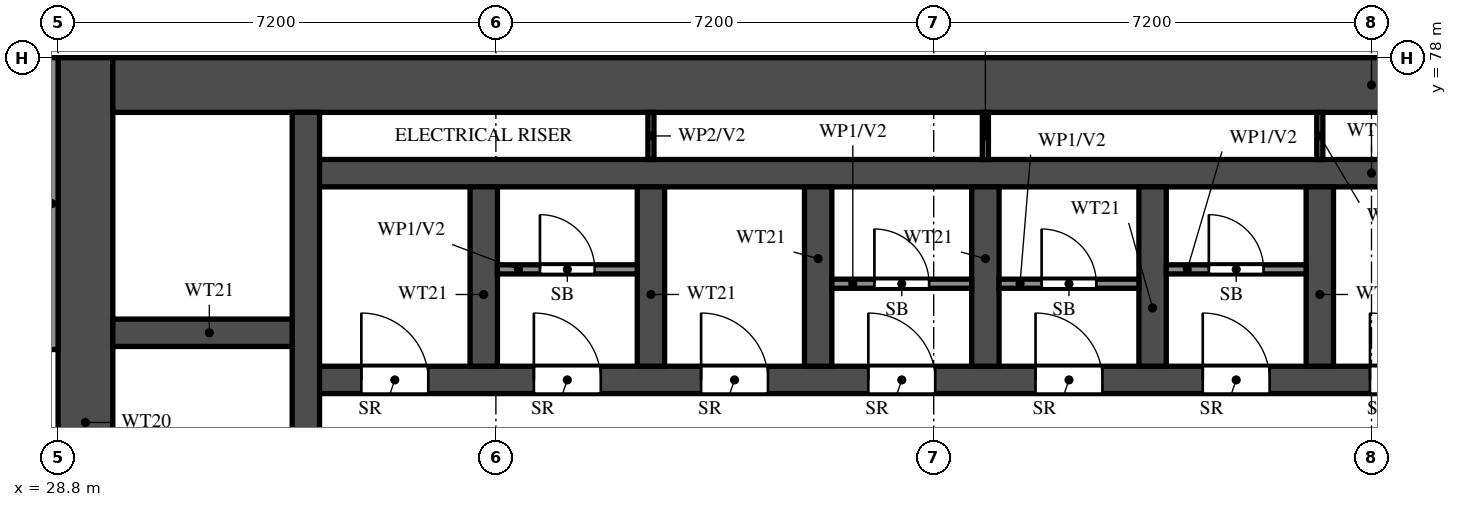
"""IFC4 building model, lengths in metres.
Left out: names, types, materials, properties, quantities, classifications, styles, units other than length and angle.
Written with IfcOpenShell. Run it as: python <this file> out.ifc"""

import sys

from ifc_helpers import new_model, si_unit, direction, frame, frame_2d, origin, place, context, subcontext, project, spatial, rectangle, extrude, element, fill, save


model = new_model("IFC4")
c1 = context("Model", 3, precision=1e-05, world=origin(), true_north=direction((0.0, 1.0)))
c2 = subcontext(c1, "Body", "Model", "MODEL_VIEW")
j1 = project(units=[si_unit("LENGTHUNIT", "METRE"), si_unit("PLANEANGLEUNIT", "RADIAN")], contexts=[c1])
p1 = place(None, origin())
s1 = spatial("IfcSite", under=j1, at=p1, CompositionType="ELEMENT")
p2 = place(p1, origin())
s2 = spatial("IfcBuilding", under=s1, at=p2, CompositionType="ELEMENT")
p3 = place(p2, frame((0.0, 0.0, 72.5)))
s3 = spatial("IfcBuildingStorey", under=s2, at=p3, CompositionType="ELEMENT", Elevation=72.5)
p4 = place(p3, frame((29.25, 66.0, 0.0), z_axis=(0.0, 0.0, 1.0), x_axis=(0.0, 1.0, 0.0)))
e1 = element("IfcWall", 1, at=p4, inside=s3, PredefinedType="SHEAR", context=c2, shape_type="SweptSolid", body=[
    extrude(rectangle(XDim=12.0, YDim=0.9, at=frame_2d((6.0, 0.0))), origin(), (0.0, 0.0, 1.0), 3.18),
])
p5 = place(p3, frame((29.7, 77.55, 0.0), z_axis=(0.0, 0.0, 1.0), x_axis=(1.0, 0.0, 0.0)))
e2 = element("IfcWall", 2, at=p5, inside=s3, PredefinedType="SHEAR", context=c2, shape_type="SweptSolid", body=[
    extrude(rectangle(XDim=41.4, YDim=0.9, at=frame_2d((20.7, 0.0))), origin(), (0.0, 0.0, 1.0), 3.18),
])
p6 = place(p3, frame((32.875, 72.7, 0.0), z_axis=(0.0, 0.0, 1.0), x_axis=(1.0, 0.0, 0.0)))
e3 = element("IfcWall", 3, at=p6, inside=s3, PredefinedType="SHEAR", context=c2, shape_type="SweptSolid", body=[
    extrude(rectangle(XDim=35.05, YDim=0.45, at=frame_2d((17.525, 0.0))), origin(), (0.0, 0.0, 1.0), 3.18),
])
p7 = place(p6, frame((19.8, 0.0, 0.0)))
e4 = element("IfcOpeningElement", 4, at=p7, cuts=e3, PredefinedType="OPENING", context=c2, shape_type="SweptSolid", body=[
    extrude(rectangle(XDim=1.1, YDim=2.1, at=frame_2d((0.55, 1.05))), frame((0.0, 0.235, 0.0), z_axis=(0.0, -1.0, 0.0), x_axis=(1.0, 0.0, 0.0)), (0.0, 0.0, 1.0), 0.47),
])
p8 = place(p6, frame((27.65, 0.0, 0.0)))
e5 = element("IfcOpeningElement", 5, at=p8, cuts=e3, PredefinedType="OPENING", context=c2, shape_type="SweptSolid", body=[
    extrude(rectangle(XDim=1.1, YDim=2.1, at=frame_2d((0.55, 1.05))), frame((0.0, 0.235, 0.0), z_axis=(0.0, -1.0, 0.0), x_axis=(1.0, 0.0, 0.0)), (0.0, 0.0, 1.0), 0.47),
])
p9 = place(p6, frame((30.25, 0.0, 0.0)))
e6 = element("IfcOpeningElement", 6, at=p9, cuts=e3, PredefinedType="OPENING", context=c2, shape_type="SweptSolid", body=[
    extrude(rectangle(XDim=1.1, YDim=2.1, at=frame_2d((0.55, 1.05))), frame((0.0, 0.235, 0.0), z_axis=(0.0, -1.0, 0.0), x_axis=(1.0, 0.0, 0.0)), (0.0, 0.0, 1.0), 0.47),
])
p10 = place(p6, frame((3.75, 0.0, 0.0)))
e7 = element("IfcOpeningElement", 7, at=p10, cuts=e3, PredefinedType="OPENING", context=c2, shape_type="SweptSolid", body=[
    extrude(rectangle(XDim=1.1, YDim=2.1, at=frame_2d((0.55, 1.05))), frame((0.0, 0.235, 0.0), z_axis=(0.0, -1.0, 0.0), x_axis=(1.0, 0.0, 0.0)), (0.0, 0.0, 1.0), 0.47),
])
p11 = place(p6, frame((6.5, 0.0, 0.0)))
e8 = element("IfcOpeningElement", 8, at=p11, cuts=e3, PredefinedType="OPENING", context=c2, shape_type="SweptSolid", body=[
    extrude(rectangle(XDim=1.1, YDim=2.1, at=frame_2d((0.55, 1.05))), frame((0.0, 0.235, 0.0), z_axis=(0.0, -1.0, 0.0), x_axis=(1.0, 0.0, 0.0)), (0.0, 0.0, 1.0), 0.47),
])
p12 = place(p6, frame((9.25, 0.0, 0.0)))
e9 = element("IfcOpeningElement", 9, at=p12, cuts=e3, PredefinedType="OPENING", context=c2, shape_type="SweptSolid", body=[
    extrude(rectangle(XDim=1.1, YDim=2.1, at=frame_2d((0.55, 1.05))), frame((0.0, 0.235, 0.0), z_axis=(0.0, -1.0, 0.0), x_axis=(1.0, 0.0, 0.0)), (0.0, 0.0, 1.0), 0.47),
])
p13 = place(p6, frame((12.0, 0.0, 0.0)))
e10 = element("IfcOpeningElement", 10, at=p13, cuts=e3, PredefinedType="OPENING", context=c2, shape_type="SweptSolid", body=[
    extrude(rectangle(XDim=1.1, YDim=2.1, at=frame_2d((0.55, 1.05))), frame((0.0, 0.235, 0.0), z_axis=(0.0, -1.0, 0.0), x_axis=(1.0, 0.0, 0.0)), (0.0, 0.0, 1.0), 0.47),
])
p14 = place(p6, frame((14.75, 0.0, 0.0)))
e11 = element("IfcOpeningElement", 11, at=p14, cuts=e3, PredefinedType="OPENING", context=c2, shape_type="SweptSolid", body=[
    extrude(rectangle(XDim=1.1, YDim=2.1, at=frame_2d((0.55, 1.05))), frame((0.0, 0.235, 0.0), z_axis=(0.0, -1.0, 0.0), x_axis=(1.0, 0.0, 0.0)), (0.0, 0.0, 1.0), 0.47),
])
p15 = place(p6, frame((17.5, 0.0, 0.0)))
e12 = element("IfcOpeningElement", 12, at=p15, cuts=e3, PredefinedType="OPENING", context=c2, shape_type="SweptSolid", body=[
    extrude(rectangle(XDim=1.1, YDim=2.1, at=frame_2d((0.55, 1.05))), frame((0.0, 0.235, 0.0), z_axis=(0.0, -1.0, 0.0), x_axis=(1.0, 0.0, 0.0)), (0.0, 0.0, 1.0), 0.47),
])
p16 = place(p6, frame((0.913, 0.0, 0.0)))
e13 = element("IfcOpeningElement", 13, at=p16, cuts=e3, PredefinedType="OPENING", context=c2, shape_type="SweptSolid", body=[
    extrude(rectangle(XDim=1.1, YDim=2.1, at=frame_2d((0.55, 1.05))), frame((0.0, 0.235, 0.0), z_axis=(0.0, -1.0, 0.0), x_axis=(1.0, 0.0, 0.0)), (0.0, 0.0, 1.0), 0.47),
])
p17 = place(p3, frame((32.875, 76.1, 0.0), z_axis=(0.0, 0.0, 1.0), x_axis=(1.0, 0.0, 0.0)))
e14 = element("IfcWall", 14, at=p17, inside=s3, PredefinedType="SHEAR", context=c2, shape_type="SweptSolid", body=[
    extrude(rectangle(XDim=35.05, YDim=0.45, at=frame_2d((17.525, 0.0))), origin(), (0.0, 0.0, 1.0), 3.18),
])
p18 = place(p3, frame((29.7, 73.475, 0.0), z_axis=(0.0, 0.0, 1.0), x_axis=(1.0, 0.0, 0.0)))
e15 = element("IfcWall", 15, at=p18, inside=s3, PredefinedType="SHEAR", context=c2, shape_type="SweptSolid", body=[
    extrude(rectangle(XDim=3.175, YDim=0.45, at=frame_2d((1.587, 0.0))), origin(), (0.0, 0.0, 1.0), 3.18),
])
p19 = place(p3, frame((32.875, 66.45, 0.0), z_axis=(0.0, 0.0, 1.0), x_axis=(0.0, 1.0, 0.0)))
e16 = element("IfcWall", 16, at=p19, inside=s3, PredefinedType="SHEAR", context=c2, shape_type="SweptSolid", body=[
    extrude(rectangle(XDim=10.65, YDim=0.45, at=frame_2d((5.325, 0.0))), origin(), (0.0, 0.0, 1.0), 3.18),
])
for number, where, z_axis, x_axis in (
    (17, (35.8, 72.925, 0.0), (0.0, 0.0, 1.0), (0.0, 1.0, 0.0)),
    (18, (38.55, 72.925, 0.0), (0.0, 0.0, 1.0), (0.0, 1.0, 0.0)),
    (19, (41.3, 72.925, 0.0), (0.0, 0.0, 1.0), (0.0, 1.0, 0.0)),
    (20, (44.05, 72.925, 0.0), (0.0, 0.0, 1.0), (0.0, 1.0, 0.0)),
    (21, (46.8, 72.925, 0.0), (0.0, 0.0, 1.0), (0.0, 1.0, 0.0)),
    (22, (49.55, 72.925, 0.0), (0.0, 0.0, 1.0), (0.0, 1.0, 0.0)),
):
    element("IfcWall", number, at=place(p3, frame(where, z_axis=z_axis, x_axis=x_axis)), inside=s3, PredefinedType="SHEAR", context=c2, shape_type="SweptSolid", body=[
        extrude(rectangle(XDim=2.95, YDim=0.45, at=frame_2d((1.475, 0.0))), origin(), (0.0, 0.0, 1.0), 3.18),
    ])
p20 = place(p3, frame((36.025, 74.518, 0.0), z_axis=(0.0, 0.0, 1.0), x_axis=(1.0, 0.0, 0.0)))
e23 = element("IfcWall", 23, at=p20, inside=s3, PredefinedType="PARTITIONING", context=c2, shape_type="SweptSolid", body=[
    extrude(rectangle(XDim=2.3, YDim=0.15, at=frame_2d((1.15, 0.0))), origin(), (0.0, 0.0, 1.0), 3.18),
])
p21 = place(p20, frame((0.7, 0.0, 0.0)))
e24 = element("IfcOpeningElement", 24, at=p21, cuts=e23, PredefinedType="OPENING", context=c2, shape_type="SweptSolid", body=[
    extrude(rectangle(XDim=0.9, YDim=2.1, at=frame_2d((0.45, 1.05))), frame((0.0, 0.085, 0.0), z_axis=(0.0, -1.0, 0.0), x_axis=(1.0, 0.0, 0.0)), (0.0, 0.0, 1.0), 0.17),
])
p22 = place(p3, frame((41.525, 74.282, 0.0), z_axis=(0.0, 0.0, 1.0), x_axis=(1.0, 0.0, 0.0)))
e25 = element("IfcWall", 25, at=p22, inside=s3, PredefinedType="PARTITIONING", context=c2, shape_type="SweptSolid", body=[
    extrude(rectangle(XDim=2.3, YDim=0.15, at=frame_2d((1.15, 0.0))), origin(), (0.0, 0.0, 1.0), 3.18),
])
p23 = place(p22, frame((0.7, 0.0, 0.0)))
e26 = element("IfcOpeningElement", 26, at=p23, cuts=e25, PredefinedType="OPENING", context=c2, shape_type="SweptSolid", body=[
    extrude(rectangle(XDim=0.9, YDim=2.1, at=frame_2d((0.45, 1.05))), frame((0.0, 0.085, 0.0), z_axis=(0.0, -1.0, 0.0), x_axis=(1.0, 0.0, 0.0)), (0.0, 0.0, 1.0), 0.17),
])
p24 = place(p3, frame((44.275, 74.282, 0.0), z_axis=(0.0, 0.0, 1.0), x_axis=(1.0, 0.0, 0.0)))
e27 = element("IfcWall", 27, at=p24, inside=s3, PredefinedType="PARTITIONING", context=c2, shape_type="SweptSolid", body=[
    extrude(rectangle(XDim=2.3, YDim=0.15, at=frame_2d((1.15, 0.0))), origin(), (0.0, 0.0, 1.0), 3.18),
])
p25 = place(p24, frame((0.7, 0.0, 0.0)))
e28 = element("IfcOpeningElement", 28, at=p25, cuts=e27, PredefinedType="OPENING", context=c2, shape_type="SweptSolid", body=[
    extrude(rectangle(XDim=0.9, YDim=2.1, at=frame_2d((0.45, 1.05))), frame((0.0, 0.085, 0.0), z_axis=(0.0, -1.0, 0.0), x_axis=(1.0, 0.0, 0.0)), (0.0, 0.0, 1.0), 0.17),
])
p26 = place(p3, frame((47.025, 74.518, 0.0), z_axis=(0.0, 0.0, 1.0), x_axis=(1.0, 0.0, 0.0)))
e29 = element("IfcWall", 29, at=p26, inside=s3, PredefinedType="PARTITIONING", context=c2, shape_type="SweptSolid", body=[
    extrude(rectangle(XDim=2.3, YDim=0.15, at=frame_2d((1.15, 0.0))), origin(), (0.0, 0.0, 1.0), 3.18),
])
p27 = place(p26, frame((0.7, 0.0, 0.0)))
e30 = element("IfcOpeningElement", 30, at=p27, cuts=e29, PredefinedType="OPENING", context=c2, shape_type="SweptSolid", body=[
    extrude(rectangle(XDim=0.9, YDim=2.1, at=frame_2d((0.45, 1.05))), frame((0.0, 0.085, 0.0), z_axis=(0.0, -1.0, 0.0), x_axis=(1.0, 0.0, 0.0)), (0.0, 0.0, 1.0), 0.17),
])
for number, where, z_axis, x_axis in (
    (31, (38.55, 76.325, 0.0), (0.0, 0.0, 1.0), (0.0, 1.0, 0.0)),
    (32, (44.05, 76.325, 0.0), (0.0, 0.0, 1.0), (0.0, 1.0, 0.0)),
    (33, (49.55, 76.325, 0.0), (0.0, 0.0, 1.0), (0.0, 1.0, 0.0)),
):
    element("IfcWall", number, at=place(p3, frame(where, z_axis=z_axis, x_axis=x_axis)), inside=s3, PredefinedType="PARTITIONING", context=c2, shape_type="SweptSolid", body=[
        extrude(rectangle(XDim=0.775, YDim=0.1, at=frame_2d((0.388, 0.0))), origin(), (0.0, 0.0, 1.0), 3.18),
    ])
p28 = place(p3, frame((28.7, 73.2, 0.0), z_axis=(0.0, 0.0, 1.0), x_axis=(0.0, 1.0, 0.0)))
e34 = element("IfcWall", 34, at=p28, inside=s3, PredefinedType="SOLIDWALL", context=c2, shape_type="SweptSolid", body=[
    extrude(rectangle(XDim=4.8, YDim=0.2, at=frame_2d((2.4, 0.0))), origin(), (0.0, 0.0, 1.0), 3.18),
])
p29 = place(p10, origin())
e35 = element("IfcDoor", 35, at=p29, inside=s3, OperationType="SINGLE_SWING_LEFT", PredefinedType="DOOR", context=c2, shape_type="SweptSolid", body=[
    extrude(rectangle(XDim=1.1, YDim=2.1, at=frame_2d((0.55, 1.05))), frame((0.0, 0.025, 0.0), z_axis=(0.0, -1.0, 0.0), x_axis=(1.0, 0.0, 0.0)), (0.0, 0.0, 1.0), 0.05),
])
fill(e7, e35)
p30 = place(p21, origin())
e36 = element("IfcDoor", 36, at=p30, inside=s3, OperationType="SINGLE_SWING_RIGHT", PredefinedType="DOOR", context=c2, shape_type="SweptSolid", body=[
    extrude(rectangle(XDim=0.9, YDim=2.1, at=frame_2d((0.45, 1.05))), frame((0.0, 0.025, 0.0), z_axis=(0.0, -1.0, 0.0), x_axis=(1.0, 0.0, 0.0)), (0.0, 0.0, 1.0), 0.05),
])
fill(e24, e36)
p31 = place(p11, origin())
e37 = element("IfcDoor", 37, at=p31, inside=s3, OperationType="SINGLE_SWING_LEFT", PredefinedType="DOOR", context=c2, shape_type="SweptSolid", body=[
    extrude(rectangle(XDim=1.1, YDim=2.1, at=frame_2d((0.55, 1.05))), frame((0.0, 0.025, 0.0), z_axis=(0.0, -1.0, 0.0), x_axis=(1.0, 0.0, 0.0)), (0.0, 0.0, 1.0), 0.05),
])
fill(e8, e37)
p32 = place(p12, origin())
e38 = element("IfcDoor", 38, at=p32, inside=s3, OperationType="SINGLE_SWING_LEFT", PredefinedType="DOOR", context=c2, shape_type="SweptSolid", body=[
    extrude(rectangle(XDim=1.1, YDim=2.1, at=frame_2d((0.55, 1.05))), frame((0.0, 0.025, 0.0), z_axis=(0.0, -1.0, 0.0), x_axis=(1.0, 0.0, 0.0)), (0.0, 0.0, 1.0), 0.05),
])
fill(e9, e38)
p33 = place(p23, origin())
e39 = element("IfcDoor", 39, at=p33, inside=s3, OperationType="SINGLE_SWING_LEFT", PredefinedType="DOOR", context=c2, shape_type="SweptSolid", body=[
    extrude(rectangle(XDim=0.9, YDim=2.1, at=frame_2d((0.45, 1.05))), frame((0.0, 0.025, 0.0), z_axis=(0.0, -1.0, 0.0), x_axis=(1.0, 0.0, 0.0)), (0.0, 0.0, 1.0), 0.05),
])
fill(e26, e39)
p34 = place(p13, origin())
e40 = element("IfcDoor", 40, at=p34, inside=s3, OperationType="SINGLE_SWING_LEFT", PredefinedType="DOOR", context=c2, shape_type="SweptSolid", body=[
    extrude(rectangle(XDim=1.1, YDim=2.1, at=frame_2d((0.55, 1.05))), frame((0.0, 0.025, 0.0), z_axis=(0.0, -1.0, 0.0), x_axis=(1.0, 0.0, 0.0)), (0.0, 0.0, 1.0), 0.05),
])
fill(e10, e40)
p35 = place(p25, origin())
e41 = element("IfcDoor", 41, at=p35, inside=s3, OperationType="SINGLE_SWING_RIGHT", PredefinedType="DOOR", context=c2, shape_type="SweptSolid", body=[
    extrude(rectangle(XDim=0.9, YDim=2.1, at=frame_2d((0.45, 1.05))), frame((0.0, 0.025, 0.0), z_axis=(0.0, -1.0, 0.0), x_axis=(1.0, 0.0, 0.0)), (0.0, 0.0, 1.0), 0.05),
])
fill(e28, e41)
p36 = place(p14, origin())
e42 = element("IfcDoor", 42, at=p36, inside=s3, OperationType="SINGLE_SWING_LEFT", PredefinedType="DOOR", context=c2, shape_type="SweptSolid", body=[
    extrude(rectangle(XDim=1.1, YDim=2.1, at=frame_2d((0.55, 1.05))), frame((0.0, 0.025, 0.0), z_axis=(0.0, -1.0, 0.0), x_axis=(1.0, 0.0, 0.0)), (0.0, 0.0, 1.0), 0.05),
])
fill(e11, e42)
p37 = place(p27, origin())
e43 = element("IfcDoor", 43, at=p37, inside=s3, OperationType="SINGLE_SWING_RIGHT", PredefinedType="DOOR", context=c2, shape_type="SweptSolid", body=[
    extrude(rectangle(XDim=0.9, YDim=2.1, at=frame_2d((0.45, 1.05))), frame((0.0, 0.025, 0.0), z_axis=(0.0, -1.0, 0.0), x_axis=(1.0, 0.0, 0.0)), (0.0, 0.0, 1.0), 0.05),
])
fill(e30, e43)
p38 = place(p15, origin())
e44 = element("IfcDoor", 44, at=p38, inside=s3, OperationType="SINGLE_SWING_LEFT", PredefinedType="DOOR", context=c2, shape_type="SweptSolid", body=[
    extrude(rectangle(XDim=1.1, YDim=2.1, at=frame_2d((0.55, 1.05))), frame((0.0, 0.025, 0.0), z_axis=(0.0, -1.0, 0.0), x_axis=(1.0, 0.0, 0.0)), (0.0, 0.0, 1.0), 0.05),
])
fill(e12, e44)
p39 = place(p16, origin())
e45 = element("IfcDoor", 45, at=p39, inside=s3, OperationType="SINGLE_SWING_LEFT", PredefinedType="DOOR", context=c2, shape_type="SweptSolid", body=[
    extrude(rectangle(XDim=1.1, YDim=2.1, at=frame_2d((0.55, 1.05))), frame((0.0, 0.025, 0.0), z_axis=(0.0, -1.0, 0.0), x_axis=(1.0, 0.0, 0.0)), (0.0, 0.0, 1.0), 0.05),
])
fill(e13, e45)
save(model, sys.argv[1])
